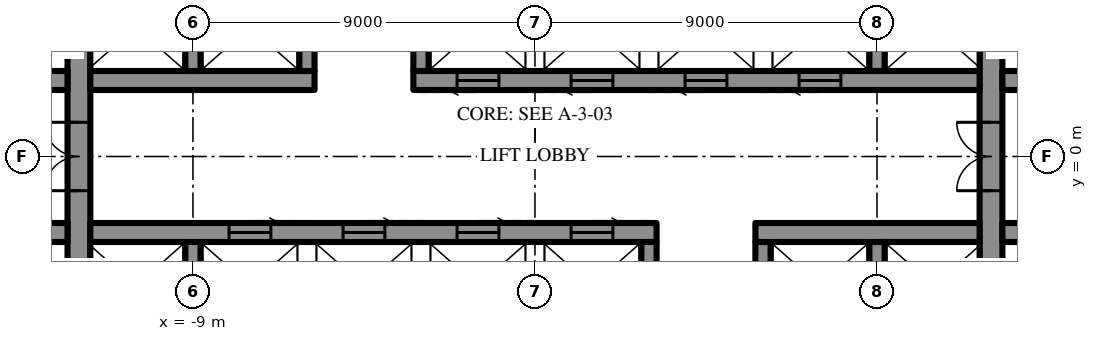
"""IFC4 building model, lengths in metres.
Left out: names, types, materials, properties, quantities, classifications, styles, units other than length and angle.
Written with IfcOpenShell. Run it as: python <this file> out.ifc"""

import sys

from ifc_helpers import new_model, si_unit, direction, frame, frame_2d, origin, place, context, subcontext, project, spatial, rectangle, extrude, element, fill, save


model = new_model("IFC4")
c1 = context("Model", 3, precision=1e-05, world=origin(), true_north=direction((0.0, 1.0)))
c2 = subcontext(c1, "Body", "Model", "MODEL_VIEW")
j1 = project(units=[si_unit("LENGTHUNIT", "METRE"), si_unit("PLANEANGLEUNIT", "RADIAN")], contexts=[c1])
p1 = place(None, origin())
s1 = spatial("IfcSite", under=j1, at=p1, CompositionType="ELEMENT")
p2 = place(p1, origin())
s2 = spatial("IfcBuilding", under=s1, at=p2, CompositionType="ELEMENT")
p3 = place(p2, frame((0.0, 0.0, 232.3)))
s3 = spatial("IfcBuildingStorey", under=s2, at=p3, CompositionType="ELEMENT", Elevation=232.3)
p4 = place(p3, frame((12.0, -10.7, 0.0), z_axis=(0.0, 0.0, 1.0), x_axis=(0.0, 1.0, 0.0)))
e1 = element("IfcWall", 1, at=p4, inside=s3, PredefinedType="SHEAR", context=c2, shape_type="SweptSolid", body=[
    extrude(rectangle(XDim=21.4, YDim=0.6, at=frame_2d((10.7, 0.0))), origin(), (0.0, 0.0, 1.0), 4.2),
])
p5 = place(p4, frame((9.8, 0.0, 0.0)))
e2 = element("IfcOpeningElement", 2, at=p5, cuts=e1, PredefinedType="OPENING", context=c2, shape_type="SweptSolid", body=[
    extrude(rectangle(XDim=1.8, YDim=2.4, at=frame_2d((0.9, 1.2))), frame((0.0, 0.31, 0.0), z_axis=(0.0, -1.0, 0.0), x_axis=(1.0, 0.0, 0.0)), (0.0, 0.0, 1.0), 0.62),
])
p6 = place(p3, frame((-12.0, -10.7, 0.0), z_axis=(0.0, 0.0, 1.0), x_axis=(0.0, 1.0, 0.0)))
e3 = element("IfcWall", 3, at=p6, inside=s3, PredefinedType="SHEAR", context=c2, shape_type="SweptSolid", body=[
    extrude(rectangle(XDim=21.4, YDim=0.6, at=frame_2d((10.7, 0.0))), origin(), (0.0, 0.0, 1.0), 4.2),
])
p7 = place(p6, frame((9.8, 0.0, 0.0)))
e4 = element("IfcOpeningElement", 4, at=p7, cuts=e3, PredefinedType="OPENING", context=c2, shape_type="SweptSolid", body=[
    extrude(rectangle(XDim=1.8, YDim=2.4, at=frame_2d((0.9, 1.2))), frame((0.0, 0.31, 0.0), z_axis=(0.0, -1.0, 0.0), x_axis=(1.0, 0.0, 0.0)), (0.0, 0.0, 1.0), 0.62),
])
p8 = place(p3, frame((-14.5, 2.0, 0.0), z_axis=(0.0, 0.0, 1.0), x_axis=(1.0, 0.0, 0.0)))
e5 = element("IfcWall", 5, at=p8, inside=s3, PredefinedType="SHEAR", context=c2, shape_type="SweptSolid", body=[
    extrude(rectangle(XDim=2.2, YDim=0.5, at=frame_2d((1.1, 0.0))), origin(), (0.0, 0.0, 1.0), 4.2),
])
p9 = place(p8, frame((0.5, 0.0, 0.0)))
e6 = element("IfcOpeningElement", 6, at=p9, cuts=e5, PredefinedType="OPENING", context=c2, shape_type="SweptSolid", body=[
    extrude(rectangle(XDim=0.9, YDim=2.2, at=frame_2d((0.45, 1.1))), frame((0.0, 0.26, 0.0), z_axis=(0.0, -1.0, 0.0), x_axis=(1.0, 0.0, 0.0)), (0.0, 0.0, 1.0), 0.52),
])
p10 = place(p3, frame((-11.7, 2.0, 0.0), z_axis=(0.0, 0.0, 1.0), x_axis=(1.0, 0.0, 0.0)))
e7 = element("IfcWall", 7, at=p10, inside=s3, PredefinedType="SHEAR", context=c2, shape_type="SweptSolid", body=[
    extrude(rectangle(XDim=5.9, YDim=0.5, at=frame_2d((2.95, 0.0))), origin(), (0.0, 0.0, 1.0), 4.2),
])
p11 = place(p3, frame((-3.2, 2.0, 0.0), z_axis=(0.0, 0.0, 1.0), x_axis=(1.0, 0.0, 0.0)))
e8 = element("IfcWall", 8, at=p11, inside=s3, PredefinedType="SHEAR", context=c2, shape_type="SweptSolid", body=[
    extrude(rectangle(XDim=14.9, YDim=0.5, at=frame_2d((7.45, 0.0))), origin(), (0.0, 0.0, 1.0), 4.2),
])
p12 = place(p11, frame((1.15, 0.0, 0.0)))
e9 = element("IfcOpeningElement", 9, at=p12, cuts=e8, PredefinedType="OPENING", context=c2, shape_type="SweptSolid", body=[
    extrude(rectangle(XDim=1.1, YDim=2.2, at=frame_2d((0.55, 1.1))), frame((0.0, 0.26, 0.0), z_axis=(0.0, -1.0, 0.0), x_axis=(1.0, 0.0, 0.0)), (0.0, 0.0, 1.0), 0.52),
])
p13 = place(p11, frame((4.15, 0.0, 0.0)))
e10 = element("IfcOpeningElement", 10, at=p13, cuts=e8, PredefinedType="OPENING", context=c2, shape_type="SweptSolid", body=[
    extrude(rectangle(XDim=1.1, YDim=2.2, at=frame_2d((0.55, 1.1))), frame((0.0, 0.26, 0.0), z_axis=(0.0, -1.0, 0.0), x_axis=(1.0, 0.0, 0.0)), (0.0, 0.0, 1.0), 0.52),
])
p14 = place(p11, frame((7.15, 0.0, 0.0)))
e11 = element("IfcOpeningElement", 11, at=p14, cuts=e8, PredefinedType="OPENING", context=c2, shape_type="SweptSolid", body=[
    extrude(rectangle(XDim=1.1, YDim=2.2, at=frame_2d((0.55, 1.1))), frame((0.0, 0.26, 0.0), z_axis=(0.0, -1.0, 0.0), x_axis=(1.0, 0.0, 0.0)), (0.0, 0.0, 1.0), 0.52),
])
p15 = place(p11, frame((10.15, 0.0, 0.0)))
e12 = element("IfcOpeningElement", 12, at=p15, cuts=e8, PredefinedType="OPENING", context=c2, shape_type="SweptSolid", body=[
    extrude(rectangle(XDim=1.1, YDim=2.2, at=frame_2d((0.55, 1.1))), frame((0.0, 0.26, 0.0), z_axis=(0.0, -1.0, 0.0), x_axis=(1.0, 0.0, 0.0)), (0.0, 0.0, 1.0), 0.52),
])
p16 = place(p3, frame((12.3, 2.0, 0.0), z_axis=(0.0, 0.0, 1.0), x_axis=(1.0, 0.0, 0.0)))
e13 = element("IfcWall", 13, at=p16, inside=s3, PredefinedType="SHEAR", context=c2, shape_type="SweptSolid", body=[
    extrude(rectangle(XDim=2.2, YDim=0.5, at=frame_2d((1.1, 0.0))), origin(), (0.0, 0.0, 1.0), 4.2),
])
p17 = place(p16, frame((0.8, 0.0, 0.0)))
e14 = element("IfcOpeningElement", 14, at=p17, cuts=e13, PredefinedType="OPENING", context=c2, shape_type="SweptSolid", body=[
    extrude(rectangle(XDim=0.9, YDim=2.2, at=frame_2d((0.45, 1.1))), frame((0.0, 0.26, 0.0), z_axis=(0.0, -1.0, 0.0), x_axis=(1.0, 0.0, 0.0)), (0.0, 0.0, 1.0), 0.52),
])
for number, where, z_axis, x_axis in (
    (15, (-9.0, 2.25, 0.0), (0.0, 0.0, 1.0), (0.0, 1.0, 0.0)),
    (16, (-6.0, 2.25, 0.0), (0.0, 0.0, 1.0), (0.0, 1.0, 0.0)),
    (17, (-3.0, 2.25, 0.0), (0.0, 0.0, 1.0), (0.0, 1.0, 0.0)),
    (18, (9.0, 2.25, 0.0), (0.0, 0.0, 1.0), (0.0, 1.0, 0.0)),
):
    element("IfcWall", number, at=place(p3, frame(where, z_axis=z_axis, x_axis=x_axis)), inside=s3, PredefinedType="SHEAR", context=c2, shape_type="SweptSolid", body=[
        extrude(rectangle(XDim=2.3, YDim=0.4, at=frame_2d((1.15, 0.0))), origin(), (0.0, 0.0, 1.0), 4.2),
    ])
p18 = place(p3, frame((14.5, -2.0, 0.0), z_axis=(0.0, 0.0, 1.0), x_axis=(-1.0, 0.0, 0.0)))
e19 = element("IfcWall", 19, at=p18, inside=s3, PredefinedType="SHEAR", context=c2, shape_type="SweptSolid", body=[
    extrude(rectangle(XDim=2.2, YDim=0.5, at=frame_2d((1.1, 0.0))), origin(), (0.0, 0.0, 1.0), 4.2),
])
p19 = place(p18, frame((0.5, 0.0, 0.0)))
e20 = element("IfcOpeningElement", 20, at=p19, cuts=e19, PredefinedType="OPENING", context=c2, shape_type="SweptSolid", body=[
    extrude(rectangle(XDim=0.9, YDim=2.2, at=frame_2d((0.45, 1.1))), frame((0.0, 0.26, 0.0), z_axis=(0.0, -1.0, 0.0), x_axis=(1.0, 0.0, 0.0)), (0.0, 0.0, 1.0), 0.52),
])
p20 = place(p3, frame((11.7, -2.0, 0.0), z_axis=(0.0, 0.0, 1.0), x_axis=(-1.0, 0.0, 0.0)))
e21 = element("IfcWall", 21, at=p20, inside=s3, PredefinedType="SHEAR", context=c2, shape_type="SweptSolid", body=[
    extrude(rectangle(XDim=5.9, YDim=0.5, at=frame_2d((2.95, 0.0))), origin(), (0.0, 0.0, 1.0), 4.2),
])
p21 = place(p3, frame((3.2, -2.0, 0.0), z_axis=(0.0, 0.0, 1.0), x_axis=(-1.0, 0.0, 0.0)))
e22 = element("IfcWall", 22, at=p21, inside=s3, PredefinedType="SHEAR", context=c2, shape_type="SweptSolid", body=[
    extrude(rectangle(XDim=14.9, YDim=0.5, at=frame_2d((7.45, 0.0))), origin(), (0.0, 0.0, 1.0), 4.2),
])
p22 = place(p21, frame((1.15, 0.0, 0.0)))
e23 = element("IfcOpeningElement", 23, at=p22, cuts=e22, PredefinedType="OPENING", context=c2, shape_type="SweptSolid", body=[
    extrude(rectangle(XDim=1.1, YDim=2.2, at=frame_2d((0.55, 1.1))), frame((0.0, 0.26, 0.0), z_axis=(0.0, -1.0, 0.0), x_axis=(1.0, 0.0, 0.0)), (0.0, 0.0, 1.0), 0.52),
])
p23 = place(p21, frame((4.15, 0.0, 0.0)))
e24 = element("IfcOpeningElement", 24, at=p23, cuts=e22, PredefinedType="OPENING", context=c2, shape_type="SweptSolid", body=[
    extrude(rectangle(XDim=1.1, YDim=2.2, at=frame_2d((0.55, 1.1))), frame((0.0, 0.26, 0.0), z_axis=(0.0, -1.0, 0.0), x_axis=(1.0, 0.0, 0.0)), (0.0, 0.0, 1.0), 0.52),
])
p24 = place(p21, frame((7.15, 0.0, 0.0)))
e25 = element("IfcOpeningElement", 25, at=p24, cuts=e22, PredefinedType="OPENING", context=c2, shape_type="SweptSolid", body=[
    extrude(rectangle(XDim=1.1, YDim=2.2, at=frame_2d((0.55, 1.1))), frame((0.0, 0.26, 0.0), z_axis=(0.0, -1.0, 0.0), x_axis=(1.0, 0.0, 0.0)), (0.0, 0.0, 1.0), 0.52),
])
p25 = place(p21, frame((10.15, 0.0, 0.0)))
e26 = element("IfcOpeningElement", 26, at=p25, cuts=e22, PredefinedType="OPENING", context=c2, shape_type="SweptSolid", body=[
    extrude(rectangle(XDim=1.1, YDim=2.2, at=frame_2d((0.55, 1.1))), frame((0.0, 0.26, 0.0), z_axis=(0.0, -1.0, 0.0), x_axis=(1.0, 0.0, 0.0)), (0.0, 0.0, 1.0), 0.52),
])
p26 = place(p3, frame((-12.3, -2.0, 0.0), z_axis=(0.0, 0.0, 1.0), x_axis=(-1.0, 0.0, 0.0)))
e27 = element("IfcWall", 27, at=p26, inside=s3, PredefinedType="SHEAR", context=c2, shape_type="SweptSolid", body=[
    extrude(rectangle(XDim=2.2, YDim=0.5, at=frame_2d((1.1, 0.0))), origin(), (0.0, 0.0, 1.0), 4.2),
])
p27 = place(p26, frame((0.8, 0.0, 0.0)))
e28 = element("IfcOpeningElement", 28, at=p27, cuts=e27, PredefinedType="OPENING", context=c2, shape_type="SweptSolid", body=[
    extrude(rectangle(XDim=0.9, YDim=2.2, at=frame_2d((0.45, 1.1))), frame((0.0, 0.26, 0.0), z_axis=(0.0, -1.0, 0.0), x_axis=(1.0, 0.0, 0.0)), (0.0, 0.0, 1.0), 0.52),
])
for number, where, z_axis, x_axis in (
    (29, (9.0, -2.25, 0.0), (0.0, 0.0, 1.0), (0.0, -1.0, 0.0)),
    (30, (6.0, -2.25, 0.0), (0.0, 0.0, 1.0), (0.0, -1.0, 0.0)),
    (31, (3.0, -2.25, 0.0), (0.0, 0.0, 1.0), (0.0, -1.0, 0.0)),
    (32, (-9.0, -2.25, 0.0), (0.0, 0.0, 1.0), (0.0, -1.0, 0.0)),
):
    element("IfcWall", number, at=place(p3, frame(where, z_axis=z_axis, x_axis=x_axis)), inside=s3, PredefinedType="SHEAR", context=c2, shape_type="SweptSolid", body=[
        extrude(rectangle(XDim=2.3, YDim=0.4, at=frame_2d((1.15, 0.0))), origin(), (0.0, 0.0, 1.0), 4.2),
    ])
p28 = place(p5, origin())
e33 = element("IfcDoor", 33, at=p28, inside=s3, OperationType="DOUBLE_DOOR_SINGLE_SWING", PredefinedType="DOOR", context=c2, shape_type="SweptSolid", body=[
    extrude(rectangle(XDim=1.8, YDim=2.4, at=frame_2d((0.9, 1.2))), frame((0.0, 0.025, 0.0), z_axis=(0.0, -1.0, 0.0), x_axis=(1.0, 0.0, 0.0)), (0.0, 0.0, 1.0), 0.05),
])
fill(e2, e33)
p29 = place(p7, origin())
e34 = element("IfcDoor", 34, at=p29, inside=s3, OperationType="DOUBLE_DOOR_SINGLE_SWING", PredefinedType="DOOR", context=c2, shape_type="SweptSolid", body=[
    extrude(rectangle(XDim=1.8, YDim=2.4, at=frame_2d((0.9, 1.2))), frame((0.0, 0.025, 0.0), z_axis=(0.0, -1.0, 0.0), x_axis=(1.0, 0.0, 0.0)), (0.0, 0.0, 1.0), 0.05),
])
fill(e4, e34)
p30 = place(p12, frame((1.1, 0.0, 0.0), z_axis=(0.0, 0.0, 1.0), x_axis=(-1.0, 0.0, 0.0)))
e35 = element("IfcDoor", 35, at=p30, inside=s3, OperationType="SLIDING_TO_LEFT", PredefinedType="DOOR", context=c2, shape_type="SweptSolid", body=[
    extrude(rectangle(XDim=1.1, YDim=2.2, at=frame_2d((0.55, 1.1))), frame((0.0, 0.025, 0.0), z_axis=(0.0, -1.0, 0.0), x_axis=(1.0, 0.0, 0.0)), (0.0, 0.0, 1.0), 0.05),
])
fill(e9, e35)
p31 = place(p13, frame((1.1, 0.0, 0.0), z_axis=(0.0, 0.0, 1.0), x_axis=(-1.0, 0.0, 0.0)))
e36 = element("IfcDoor", 36, at=p31, inside=s3, OperationType="SLIDING_TO_LEFT", PredefinedType="DOOR", context=c2, shape_type="SweptSolid", body=[
    extrude(rectangle(XDim=1.1, YDim=2.2, at=frame_2d((0.55, 1.1))), frame((0.0, 0.025, 0.0), z_axis=(0.0, -1.0, 0.0), x_axis=(1.0, 0.0, 0.0)), (0.0, 0.0, 1.0), 0.05),
])
fill(e10, e36)
p32 = place(p14, frame((1.1, 0.0, 0.0), z_axis=(0.0, 0.0, 1.0), x_axis=(-1.0, 0.0, 0.0)))
e37 = element("IfcDoor", 37, at=p32, inside=s3, OperationType="SLIDING_TO_LEFT", PredefinedType="DOOR", context=c2, shape_type="SweptSolid", body=[
    extrude(rectangle(XDim=1.1, YDim=2.2, at=frame_2d((0.55, 1.1))), frame((0.0, 0.025, 0.0), z_axis=(0.0, -1.0, 0.0), x_axis=(1.0, 0.0, 0.0)), (0.0, 0.0, 1.0), 0.05),
])
fill(e11, e37)
p33 = place(p15, frame((1.1, 0.0, 0.0), z_axis=(0.0, 0.0, 1.0), x_axis=(-1.0, 0.0, 0.0)))
e38 = element("IfcDoor", 38, at=p33, inside=s3, OperationType="SLIDING_TO_LEFT", PredefinedType="DOOR", context=c2, shape_type="SweptSolid", body=[
    extrude(rectangle(XDim=1.1, YDim=2.2, at=frame_2d((0.55, 1.1))), frame((0.0, 0.025, 0.0), z_axis=(0.0, -1.0, 0.0), x_axis=(1.0, 0.0, 0.0)), (0.0, 0.0, 1.0), 0.05),
])
fill(e12, e38)
p34 = place(p22, frame((1.1, 0.0, 0.0), z_axis=(0.0, 0.0, 1.0), x_axis=(-1.0, 0.0, 0.0)))
e39 = element("IfcDoor", 39, at=p34, inside=s3, OperationType="SLIDING_TO_LEFT", PredefinedType="DOOR", context=c2, shape_type="SweptSolid", body=[
    extrude(rectangle(XDim=1.1, YDim=2.2, at=frame_2d((0.55, 1.1))), frame((0.0, 0.025, 0.0), z_axis=(0.0, -1.0, 0.0), x_axis=(1.0, 0.0, 0.0)), (0.0, 0.0, 1.0), 0.05),
])
fill(e23, e39)
p35 = place(p23, frame((1.1, 0.0, 0.0), z_axis=(0.0, 0.0, 1.0), x_axis=(-1.0, 0.0, 0.0)))
e40 = element("IfcDoor", 40, at=p35, inside=s3, OperationType="SLIDING_TO_LEFT", PredefinedType="DOOR", context=c2, shape_type="SweptSolid", body=[
    extrude(rectangle(XDim=1.1, YDim=2.2, at=frame_2d((0.55, 1.1))), frame((0.0, 0.025, 0.0), z_axis=(0.0, -1.0, 0.0), x_axis=(1.0, 0.0, 0.0)), (0.0, 0.0, 1.0), 0.05),
])
fill(e24, e40)
p36 = place(p24, frame((1.1, 0.0, 0.0), z_axis=(0.0, 0.0, 1.0), x_axis=(-1.0, 0.0, 0.0)))
e41 = element("IfcDoor", 41, at=p36, inside=s3, OperationType="SLIDING_TO_LEFT", PredefinedType="DOOR", context=c2, shape_type="SweptSolid", body=[
    extrude(rectangle(XDim=1.1, YDim=2.2, at=frame_2d((0.55, 1.1))), frame((0.0, 0.025, 0.0), z_axis=(0.0, -1.0, 0.0), x_axis=(1.0, 0.0, 0.0)), (0.0, 0.0, 1.0), 0.05),
])
fill(e25, e41)
p37 = place(p25, frame((1.1, 0.0, 0.0), z_axis=(0.0, 0.0, 1.0), x_axis=(-1.0, 0.0, 0.0)))
e42 = element("IfcDoor", 42, at=p37, inside=s3, OperationType="SLIDING_TO_LEFT", PredefinedType="DOOR", context=c2, shape_type="SweptSolid", body=[
    extrude(rectangle(XDim=1.1, YDim=2.2, at=frame_2d((0.55, 1.1))), frame((0.0, 0.025, 0.0), z_axis=(0.0, -1.0, 0.0), x_axis=(1.0, 0.0, 0.0)), (0.0, 0.0, 1.0), 0.05),
])
fill(e26, e42)
save(model, sys.argv[1])
